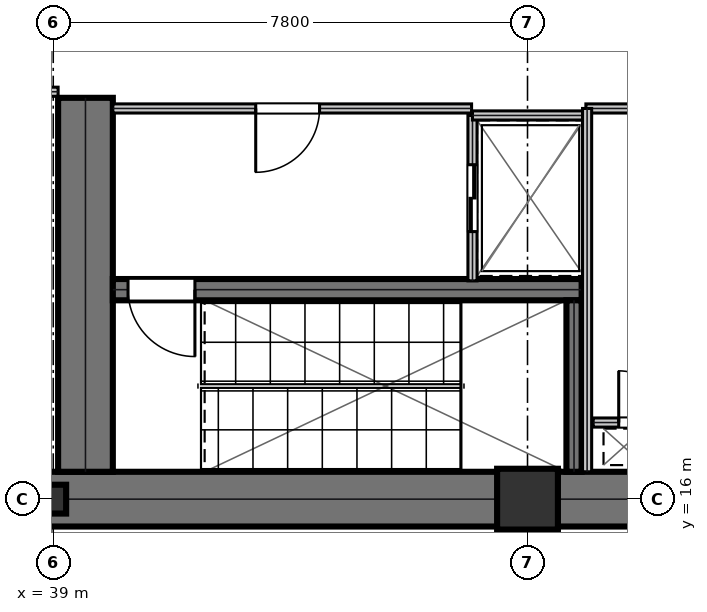
"""IFC4 building model, lengths in metres.
Left out: names, types, materials, properties, quantities, classifications, styles, units other than length and angle.
Written with IfcOpenShell. Run it as: python <this file> out.ifc"""

import sys

from ifc_helpers import new_model, si_unit, direction, frame, frame_2d, origin, origin_2d, place, context, subcontext, project, spatial, rectangle, i_section, extrude, element, fill, save


model = new_model("IFC4")
c1 = context("Model", 3, precision=1e-05, world=origin(), true_north=direction((0.0, 1.0)))
c2 = subcontext(c1, "Body", "Model", "MODEL_VIEW")
j1 = project(units=[si_unit("LENGTHUNIT", "METRE"), si_unit("PLANEANGLEUNIT", "RADIAN")], contexts=[c1])
p1 = place(None, origin())
s1 = spatial("IfcSite", under=j1, at=p1, CompositionType="ELEMENT")
p2 = place(p1, origin())
s2 = spatial("IfcBuilding", under=s1, at=p2, CompositionType="ELEMENT")
p3 = place(p2, frame((0.0, 0.0, 5.4)))
s3 = spatial("IfcBuildingStorey", under=s2, at=p3, CompositionType="ELEMENT", Elevation=5.4)
p4 = place(p3, frame((38.8, 16.0, 0.0), z_axis=(0.0, 0.0, 1.0), x_axis=(1.0, 0.0, 0.0)))
e1 = element("IfcWall", 1, at=p4, inside=s3, PredefinedType="SHEAR", context=c2, shape_type="SweptSolid", body=[
    extrude(rectangle(XDim=16.0, YDim=0.9, at=frame_2d((8.0, 0.0))), origin(), (0.0, 0.0, 1.0), 5.12),
])
p5 = place(p3, frame((39.53, 16.45, 0.0), z_axis=(0.0, 0.0, 1.0), x_axis=(0.0, 1.0, 0.0)))
e2 = element("IfcWall", 2, at=p5, inside=s3, PredefinedType="SHEAR", context=c2, shape_type="SweptSolid", body=[
    extrude(rectangle(XDim=6.15, YDim=0.9, at=frame_2d((3.075, 0.0))), origin(), (0.0, 0.0, 1.0), 5.12),
])
p6 = place(p3, frame((39.98, 19.445, 0.0), z_axis=(0.0, 0.0, 1.0), x_axis=(1.0, 0.0, 0.0)))
e3 = element("IfcWall", 3, at=p6, inside=s3, PredefinedType="SHEAR", context=c2, shape_type="SweptSolid", body=[
    extrude(rectangle(XDim=7.71, YDim=0.35, at=frame_2d((3.855, 0.0))), origin(), (0.0, 0.0, 1.0), 5.12),
])
p7 = place(p6, frame((0.25, 0.0, 0.0)))
e4 = element("IfcOpeningElement", 4, at=p7, cuts=e3, PredefinedType="OPENING", context=c2, shape_type="SweptSolid", body=[
    extrude(rectangle(XDim=1.1, YDim=2.15, at=frame_2d((0.55, 1.075))), frame((0.0, 0.185, 0.0), z_axis=(0.0, -1.0, 0.0), x_axis=(1.0, 0.0, 0.0)), (0.0, 0.0, 1.0), 0.37),
])
p8 = place(p3, frame((47.565, 16.45, 0.0), z_axis=(0.0, 0.0, 1.0), x_axis=(0.0, 1.0, 0.0)))
e5 = element("IfcWall", 5, at=p8, inside=s3, PredefinedType="SHEAR", context=c2, shape_type="SweptSolid", body=[
    extrude(rectangle(XDim=2.82, YDim=0.25, at=frame_2d((1.41, 0.0))), origin(), (0.0, 0.0, 1.0), 5.12),
])
p9 = place(p3, frame((39.0, 16.0, 0.0), z_axis=(0.0, 0.0, 1.0), x_axis=(1.0, 0.0, 0.0)))
e6 = element("IfcColumn", 6, at=p9, inside=s3, PredefinedType="COLUMN", context=c2, shape_type="SweptSolid", body=[
    extrude(i_section(OverallWidth=0.424, OverallDepth=0.474, WebThickness=0.048, FlangeThickness=0.077, at=origin_2d()), origin(), (0.0, 0.0, 1.0), 5.395),
])
p10 = place(p3, frame((46.8, 16.0, 0.0), z_axis=(0.0, 0.0, 1.0), x_axis=(1.0, 0.0, 0.0)))
e7 = element("IfcColumn", 7, at=p10, inside=s3, PredefinedType="COLUMN", context=c2, shape_type="SweptSolid", body=[
    extrude(rectangle(XDim=1.0, YDim=1.0, at=origin_2d()), origin(), (0.0, 0.0, 1.0), 5.395),
])
p11 = place(p3, frame((39.98, 22.425, 0.0), z_axis=(0.0, 0.0, 1.0), x_axis=(1.0, 0.0, 0.0)))
e8 = element("IfcWall", 8, at=p11, inside=s3, PredefinedType="PARTITIONING", context=c2, shape_type="SweptSolid", body=[
    extrude(rectangle(XDim=5.9, YDim=0.15, at=frame_2d((2.95, 0.0))), origin(), (0.0, 0.0, 1.0), 5.12),
])
p12 = place(p11, frame((2.35, 0.0, 0.0)))
e9 = element("IfcOpeningElement", 9, at=p12, cuts=e8, PredefinedType="OPENING", context=c2, shape_type="SweptSolid", body=[
    extrude(rectangle(XDim=1.05, YDim=2.15, at=frame_2d((0.525, 1.075))), frame((0.0, 0.085, 0.0), z_axis=(0.0, -1.0, 0.0), x_axis=(1.0, 0.0, 0.0)), (0.0, 0.0, 1.0), 0.17),
])
p13 = place(p3, frame((45.895, 19.59, 0.0), z_axis=(0.0, 0.0, 1.0), x_axis=(0.0, 1.0, 0.0)))
e10 = element("IfcWall", 10, at=p13, inside=s3, PredefinedType="PARTITIONING", context=c2, shape_type="SweptSolid", body=[
    extrude(rectangle(XDim=2.72, YDim=0.15, at=frame_2d((1.36, 0.0))), origin(), (0.0, 0.0, 1.0), 5.12),
])
p14 = place(p13, frame((0.81, 0.0, 0.0)))
e11 = element("IfcOpeningElement", 11, at=p14, cuts=e10, PredefinedType="OPENING", context=c2, shape_type="SweptSolid", body=[
    extrude(rectangle(XDim=1.1, YDim=2.15, at=frame_2d((0.55, 1.075))), frame((0.0, 0.085, 0.0), z_axis=(0.0, -1.0, 0.0), x_axis=(1.0, 0.0, 0.0)), (0.0, 0.0, 1.0), 0.17),
])
p15 = place(p3, frame((45.895, 22.31, 0.0), z_axis=(0.0, 0.0, 1.0), x_axis=(1.0, 0.0, 0.0)))
e12 = element("IfcWall", 12, at=p15, inside=s3, PredefinedType="PARTITIONING", context=c2, shape_type="SweptSolid", body=[
    extrude(rectangle(XDim=1.915, YDim=0.15, at=frame_2d((0.958, 0.0))), origin(), (0.0, 0.0, 1.0), 5.12),
])
p16 = place(p3, frame((47.88, 17.26, 0.0), z_axis=(0.0, 0.0, 1.0), x_axis=(1.0, 0.0, 0.0)))
e13 = element("IfcWall", 13, at=p16, inside=s3, PredefinedType="PARTITIONING", context=c2, shape_type="SweptSolid", body=[
    extrude(rectangle(XDim=1.72, YDim=0.15, at=frame_2d((0.86, 0.0))), origin(), (0.0, 0.0, 1.0), 5.12),
])
p17 = place(p16, frame((0.42, 0.0, 0.0)))
e14 = element("IfcOpeningElement", 14, at=p17, cuts=e13, PredefinedType="OPENING", context=c2, shape_type="SweptSolid", body=[
    extrude(rectangle(XDim=0.85, YDim=2.15, at=frame_2d((0.425, 1.075))), frame((0.0, 0.085, 0.0), z_axis=(0.0, -1.0, 0.0), x_axis=(1.0, 0.0, 0.0)), (0.0, 0.0, 1.0), 0.17),
])
p18 = place(p3, frame((47.76, 22.425, 0.0), z_axis=(0.0, 0.0, 1.0), x_axis=(1.0, 0.0, 0.0)))
e15 = element("IfcWall", 15, at=p18, inside=s3, PredefinedType="PARTITIONING", context=c2, shape_type="SweptSolid", body=[
    extrude(rectangle(XDim=1.96, YDim=0.15, at=frame_2d((0.98, 0.0))), origin(), (0.0, 0.0, 1.0), 5.12),
])
p19 = place(p3, frame((47.78, 16.45, 0.0), z_axis=(0.0, 0.0, 1.0), x_axis=(0.0, 1.0, 0.0)))
e16 = element("IfcWall", 16, at=p19, inside=s3, PredefinedType="PARTITIONING", context=c2, shape_type="SweptSolid", body=[
    extrude(rectangle(XDim=5.975, YDim=0.15, at=frame_2d((2.988, 0.0))), origin(), (0.0, 0.0, 1.0), 5.12),
])
p20 = place(p3, frame((36.8, 22.7, 0.0), z_axis=(0.0, 0.0, 1.0), x_axis=(1.0, 0.0, 0.0)))
e17 = element("IfcWall", 17, at=p20, inside=s3, PredefinedType="PARTITIONING", context=c2, shape_type="SweptSolid", body=[
    extrude(rectangle(XDim=2.28, YDim=0.15, at=frame_2d((1.14, 0.0))), origin(), (0.0, 0.0, 1.0), 4.415),
])
p21 = place(p12, frame((1.05, 0.0, 0.0), z_axis=(0.0, 0.0, 1.0), x_axis=(-1.0, 0.0, 0.0)))
e18 = element("IfcDoor", 18, at=p21, inside=s3, OperationType="SINGLE_SWING_RIGHT", PredefinedType="DOOR", context=c2, shape_type="SweptSolid", body=[
    extrude(rectangle(XDim=1.05, YDim=2.15, at=frame_2d((0.525, 1.075))), frame((0.0, 0.025, 0.0), z_axis=(0.0, -1.0, 0.0), x_axis=(1.0, 0.0, 0.0)), (0.0, 0.0, 1.0), 0.05),
])
fill(e9, e18)
p22 = place(p14, frame((1.1, 0.0, 0.0), z_axis=(0.0, 0.0, 1.0), x_axis=(-1.0, 0.0, 0.0)))
e19 = element("IfcDoor", 19, at=p22, inside=s3, OperationType="DOUBLE_DOOR_SLIDING", PredefinedType="DOOR", context=c2, shape_type="SweptSolid", body=[
    extrude(rectangle(XDim=1.1, YDim=2.15, at=frame_2d((0.55, 1.075))), frame((0.0, 0.025, 0.0), z_axis=(0.0, -1.0, 0.0), x_axis=(1.0, 0.0, 0.0)), (0.0, 0.0, 1.0), 0.05),
])
fill(e11, e19)
p23 = place(p17, origin())
e20 = element("IfcDoor", 20, at=p23, inside=s3, OperationType="SINGLE_SWING_LEFT", PredefinedType="TRAPDOOR", context=c2, shape_type="SweptSolid", body=[
    extrude(rectangle(XDim=0.85, YDim=2.15, at=frame_2d((0.425, 1.075))), frame((0.0, 0.025, 0.0), z_axis=(0.0, -1.0, 0.0), x_axis=(1.0, 0.0, 0.0)), (0.0, 0.0, 1.0), 0.05),
])
fill(e14, e20)
p24 = place(p7, frame((1.1, 0.0, 0.0), z_axis=(0.0, 0.0, 1.0), x_axis=(-1.0, 0.0, 0.0)))
e21 = element("IfcDoor", 21, at=p24, inside=s3, OperationType="SINGLE_SWING_LEFT", PredefinedType="DOOR", context=c2, shape_type="SweptSolid", body=[
    extrude(rectangle(XDim=1.1, YDim=2.15, at=frame_2d((0.55, 1.075))), frame((0.0, 0.025, 0.0), z_axis=(0.0, -1.0, 0.0), x_axis=(1.0, 0.0, 0.0)), (0.0, 0.0, 1.0), 0.05),
])
fill(e4, e21)
save(model, sys.argv[1])
